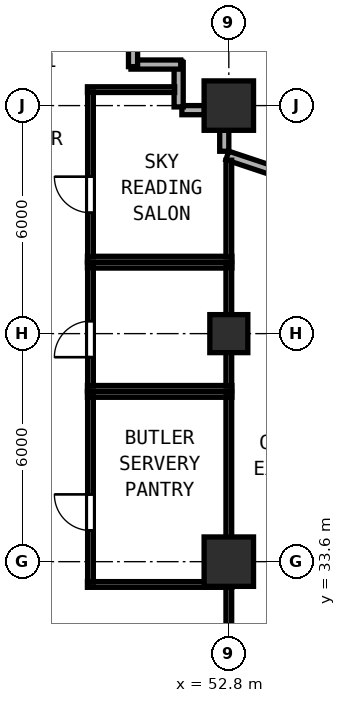
"""IFC4 building model, lengths in metres.
Left out: names, types, materials, properties, quantities, classifications, styles, units other than length and angle.
Written with IfcOpenShell. Run it as: python <this file> out.ifc"""

import sys

from ifc_helpers import new_model, si_unit, direction, frame, frame_2d, origin, origin_2d, place, context, subcontext, project, spatial, rectangle, hollow_rectangle, extrude, element, fill, save


model = new_model("IFC4")
c1 = context("Model", 3, precision=1e-05, world=origin(), true_north=direction((0.0, 1.0)))
c2 = subcontext(c1, "Body", "Model", "MODEL_VIEW")
j1 = project(units=[si_unit("LENGTHUNIT", "METRE"), si_unit("PLANEANGLEUNIT", "RADIAN")], contexts=[c1])
p1 = place(None, origin())
s1 = spatial("IfcSite", under=j1, at=p1, CompositionType="ELEMENT")
p2 = place(p1, origin())
s2 = spatial("IfcBuilding", under=s1, at=p2, CompositionType="ELEMENT")
p3 = place(p2, frame((0.0, 0.0, 39.2)))
s3 = spatial("IfcBuildingStorey", under=s2, at=p3, CompositionType="ELEMENT", Elevation=39.2)
for number, where, z_axis, x_axis in (
    (1, (52.8, 33.6, 0.0), (0.0, 0.0, 1.0), (1.0, 0.0, 0.0)),
    (2, (52.8, 45.6, 0.0), (0.0, 0.0, 1.0), (1.0, 0.0, 0.0)),
):
    element("IfcColumn", number, at=place(p3, frame(where, z_axis=z_axis, x_axis=x_axis)), inside=s3, PredefinedType="COLUMN", context=c2, shape_type="SweptSolid", body=[
        extrude(hollow_rectangle(XDim=1.3, YDim=1.3, WallThickness=0.048, at=origin_2d()), origin(), (0.0, 0.0, 1.0), 3.8),
    ])
p4 = place(p3, frame((52.8, 39.6, 0.0), z_axis=(0.0, 0.0, 1.0), x_axis=(1.0, 0.0, 0.0)))
e3 = element("IfcColumn", 3, at=p4, inside=s3, PredefinedType="COLUMN", context=c2, shape_type="SweptSolid", body=[
    extrude(hollow_rectangle(XDim=1.0, YDim=1.0, WallThickness=0.038, at=origin_2d()), origin(), (0.0, 0.0, 1.0), 3.8),
])
p5 = place(p3, frame((58.145, 42.492, 0.0), z_axis=(0.0, 0.0, 1.0), x_axis=(-0.948683298051, 0.316227766017, 0.0)))
e4 = element("IfcWall", 4, at=p5, inside=s3, PredefinedType="SOLIDWALL", context=c2, shape_type="SweptSolid", body=[
    extrude(rectangle(XDim=5.675, YDim=0.24, at=frame_2d((2.838, 0.0))), origin(), (0.0, 0.0, 1.0), 3.037),
])
p6 = place(p5, frame((1.6, 0.0, 0.85)))
e5 = element("IfcOpeningElement", 5, at=p6, cuts=e4, PredefinedType="OPENING", context=c2, shape_type="SweptSolid", body=[
    extrude(rectangle(XDim=1.2, YDim=1.85, at=frame_2d((0.6, 0.925))), frame((0.0, 0.13, 0.0), z_axis=(0.0, -1.0, 0.0), x_axis=(1.0, 0.0, 0.0)), (0.0, 0.0, 1.0), 0.26),
])
p7 = place(p3, frame((52.68, 44.398, 0.0), z_axis=(0.0, 0.0, 1.0), x_axis=(0.0, 1.0, 0.0)))
e6 = element("IfcWall", 6, at=p7, inside=s3, PredefinedType="SOLIDWALL", context=c2, shape_type="SweptSolid", body=[
    extrude(rectangle(XDim=0.56, YDim=0.24, at=frame_2d((0.28, 0.0))), origin(), (0.0, 0.0, 1.0), 3.037),
])
p8 = place(p3, frame((52.158, 45.48, 0.0), z_axis=(0.0, 0.0, 1.0), x_axis=(-1.0, 0.0, 0.0)))
e7 = element("IfcWall", 7, at=p8, inside=s3, PredefinedType="SOLIDWALL", context=c2, shape_type="SweptSolid", body=[
    extrude(rectangle(XDim=0.593, YDim=0.24, at=frame_2d((0.296, 0.0))), origin(), (0.0, 0.0, 1.0), 3.54),
])
p9 = place(p3, frame((51.48, 45.565, 0.0), z_axis=(0.0, 0.0, 1.0), x_axis=(0.0, 1.0, 0.0)))
e8 = element("IfcWall", 8, at=p9, inside=s3, PredefinedType="SOLIDWALL", context=c2, shape_type="SweptSolid", body=[
    extrude(rectangle(XDim=1.17, YDim=0.24, at=frame_2d((0.585, 0.0))), origin(), (0.0, 0.0, 1.0), 3.54),
])
p10 = place(p3, frame((51.535, 46.68, 0.0), z_axis=(0.0, 0.0, 1.0), x_axis=(-1.0, 0.0, 0.0)))
e9 = element("IfcWall", 9, at=p10, inside=s3, PredefinedType="SOLIDWALL", context=c2, shape_type="SweptSolid", body=[
    extrude(rectangle(XDim=1.31, YDim=0.24, at=frame_2d((0.655, 0.0))), origin(), (0.0, 0.0, 1.0), 3.54),
])
p11 = place(p3, frame((50.28, 46.625, 0.0), z_axis=(0.0, 0.0, 1.0), x_axis=(0.0, 1.0, 0.0)))
e10 = element("IfcWall", 10, at=p11, inside=s3, PredefinedType="SOLIDWALL", context=c2, shape_type="SweptSolid", body=[
    extrude(rectangle(XDim=1.37, YDim=0.24, at=frame_2d((0.685, 0.0))), origin(), (0.0, 0.0, 1.0), 3.54),
])
for number, where, z_axis, x_axis in (
    (11, (49.08, 38.0, 0.0), (0.0, 0.0, 1.0), (1.0, 0.0, 0.0)),
    (12, (49.08, 33.0, 0.0), (0.0, 0.0, 1.0), (1.0, 0.0, 0.0)),
):
    element("IfcWall", number, at=place(p3, frame(where, z_axis=z_axis, x_axis=x_axis)), inside=s3, PredefinedType="PARTITIONING", context=c2, shape_type="SweptSolid", body=[
        extrude(rectangle(XDim=3.8, YDim=0.15, at=frame_2d((1.9, 0.0))), origin(), (0.0, 0.0, 1.0), 3.54),
    ])
p12 = place(p3, frame((49.16, 33.06, 0.0), z_axis=(0.0, 0.0, 1.0), x_axis=(0.0, 1.0, 0.0)))
e13 = element("IfcWall", 13, at=p12, inside=s3, PredefinedType="PARTITIONING", context=c2, shape_type="SweptSolid", body=[
    extrude(rectangle(XDim=4.88, YDim=0.15, at=frame_2d((2.44, 0.0))), origin(), (0.0, 0.0, 1.0), 3.54),
])
p13 = place(p12, frame((1.36, 0.0, 0.0)))
e14 = element("IfcOpeningElement", 14, at=p13, cuts=e13, PredefinedType="OPENING", context=c2, shape_type="SweptSolid", body=[
    extrude(rectangle(XDim=0.95, YDim=2.12, at=frame_2d((0.475, 1.06))), frame((0.0, 0.085, 0.0), z_axis=(0.0, -1.0, 0.0), x_axis=(1.0, 0.0, 0.0)), (0.0, 0.0, 1.0), 0.17),
])
p14 = place(p3, frame((52.8, 33.06, 0.0), z_axis=(0.0, 0.0, 1.0), x_axis=(0.0, 1.0, 0.0)))
e15 = element("IfcWall", 15, at=p14, inside=s3, PredefinedType="PARTITIONING", context=c2, shape_type="SweptSolid", body=[
    extrude(rectangle(XDim=4.88, YDim=0.15, at=frame_2d((2.44, 0.0))), origin(), (0.0, 0.0, 1.0), 3.037),
])
for number, where, z_axis, x_axis in (
    (16, (49.08, 41.4, 0.0), (0.0, 0.0, 1.0), (1.0, 0.0, 0.0)),
    (17, (49.08, 38.16, 0.0), (0.0, 0.0, 1.0), (1.0, 0.0, 0.0)),
):
    element("IfcWall", number, at=place(p3, frame(where, z_axis=z_axis, x_axis=x_axis)), inside=s3, PredefinedType="PARTITIONING", context=c2, shape_type="SweptSolid", body=[
        extrude(rectangle(XDim=3.8, YDim=0.15, at=frame_2d((1.9, 0.0))), origin(), (0.0, 0.0, 1.0), 3.54),
    ])
p15 = place(p3, frame((49.16, 38.22, 0.0), z_axis=(0.0, 0.0, 1.0), x_axis=(0.0, 1.0, 0.0)))
e18 = element("IfcWall", 18, at=p15, inside=s3, PredefinedType="PARTITIONING", context=c2, shape_type="SweptSolid", body=[
    extrude(rectangle(XDim=3.12, YDim=0.15, at=frame_2d((1.56, 0.0))), origin(), (0.0, 0.0, 1.0), 3.54),
])
p16 = place(p15, frame((0.76, 0.0, 0.0)))
e19 = element("IfcOpeningElement", 19, at=p16, cuts=e18, PredefinedType="OPENING", context=c2, shape_type="SweptSolid", body=[
    extrude(rectangle(XDim=0.95, YDim=2.12, at=frame_2d((0.475, 1.06))), frame((0.0, 0.085, 0.0), z_axis=(0.0, -1.0, 0.0), x_axis=(1.0, 0.0, 0.0)), (0.0, 0.0, 1.0), 0.17),
])
p17 = place(p3, frame((52.8, 38.22, 0.0), z_axis=(0.0, 0.0, 1.0), x_axis=(0.0, 1.0, 0.0)))
e20 = element("IfcWall", 20, at=p17, inside=s3, PredefinedType="PARTITIONING", context=c2, shape_type="SweptSolid", body=[
    extrude(rectangle(XDim=3.12, YDim=0.15, at=frame_2d((1.56, 0.0))), origin(), (0.0, 0.0, 1.0), 3.037),
])
p18 = place(p3, frame((49.08, 46.02, 0.0), z_axis=(0.0, 0.0, 1.0), x_axis=(1.0, 0.0, 0.0)))
e21 = element("IfcWall", 21, at=p18, inside=s3, PredefinedType="PARTITIONING", context=c2, shape_type="SweptSolid", body=[
    extrude(rectangle(XDim=2.295, YDim=0.15, at=frame_2d((1.147, 0.0))), origin(), (0.0, 0.0, 1.0), 3.54),
])
p19 = place(p3, frame((49.08, 41.56, 0.0), z_axis=(0.0, 0.0, 1.0), x_axis=(1.0, 0.0, 0.0)))
e22 = element("IfcWall", 22, at=p19, inside=s3, PredefinedType="PARTITIONING", context=c2, shape_type="SweptSolid", body=[
    extrude(rectangle(XDim=3.8, YDim=0.15, at=frame_2d((1.9, 0.0))), origin(), (0.0, 0.0, 1.0), 3.54),
])
p20 = place(p3, frame((49.16, 41.62, 0.0), z_axis=(0.0, 0.0, 1.0), x_axis=(0.0, 1.0, 0.0)))
e23 = element("IfcWall", 23, at=p20, inside=s3, PredefinedType="PARTITIONING", context=c2, shape_type="SweptSolid", body=[
    extrude(rectangle(XDim=4.34, YDim=0.15, at=frame_2d((2.17, 0.0))), origin(), (0.0, 0.0, 1.0), 3.54),
])
p21 = place(p20, frame((1.16, 0.0, 0.0)))
e24 = element("IfcOpeningElement", 24, at=p21, cuts=e23, PredefinedType="OPENING", context=c2, shape_type="SweptSolid", body=[
    extrude(rectangle(XDim=0.95, YDim=2.12, at=frame_2d((0.475, 1.06))), frame((0.0, 0.085, 0.0), z_axis=(0.0, -1.0, 0.0), x_axis=(1.0, 0.0, 0.0)), (0.0, 0.0, 1.0), 0.17),
])
p22 = place(p3, frame((52.8, 41.62, 0.0), z_axis=(0.0, 0.0, 1.0), x_axis=(0.0, 1.0, 0.0)))
e25 = element("IfcWall", 25, at=p22, inside=s3, PredefinedType="PARTITIONING", context=c2, shape_type="SweptSolid", body=[
    extrude(rectangle(XDim=2.543, YDim=0.15, at=frame_2d((1.271, 0.0))), origin(), (0.0, 0.0, 1.0), 3.037),
])
p23 = place(p3, frame((52.8, 26.34, 0.0), z_axis=(0.0, 0.0, 1.0), x_axis=(0.0, 1.0, 0.0)))
e26 = element("IfcWall", 26, at=p23, inside=s3, PredefinedType="PARTITIONING", context=c2, shape_type="SweptSolid", body=[
    extrude(rectangle(XDim=6.6, YDim=0.15, at=frame_2d((3.3, 0.0))), origin(), (0.0, 0.0, 1.0), 3.037),
])
p24 = place(p13, origin())
e27 = element("IfcDoor", 27, at=p24, inside=s3, OperationType="SINGLE_SWING_RIGHT", PredefinedType="DOOR", context=c2, shape_type="SweptSolid", body=[
    extrude(rectangle(XDim=0.95, YDim=2.12, at=frame_2d((0.475, 1.06))), frame((0.0, 0.025, 0.0), z_axis=(0.0, -1.0, 0.0), x_axis=(1.0, 0.0, 0.0)), (0.0, 0.0, 1.0), 0.05),
])
fill(e14, e27)
p25 = place(p16, origin())
e28 = element("IfcDoor", 28, at=p25, inside=s3, OperationType="SINGLE_SWING_LEFT", PredefinedType="DOOR", context=c2, shape_type="SweptSolid", body=[
    extrude(rectangle(XDim=0.95, YDim=2.12, at=frame_2d((0.475, 1.06))), frame((0.0, 0.025, 0.0), z_axis=(0.0, -1.0, 0.0), x_axis=(1.0, 0.0, 0.0)), (0.0, 0.0, 1.0), 0.05),
])
fill(e19, e28)
p26 = place(p21, origin())
e29 = element("IfcDoor", 29, at=p26, inside=s3, OperationType="SINGLE_SWING_RIGHT", PredefinedType="DOOR", context=c2, shape_type="SweptSolid", body=[
    extrude(rectangle(XDim=0.95, YDim=2.12, at=frame_2d((0.475, 1.06))), frame((0.0, 0.025, 0.0), z_axis=(0.0, -1.0, 0.0), x_axis=(1.0, 0.0, 0.0)), (0.0, 0.0, 1.0), 0.05),
])
fill(e24, e29)
save(model, sys.argv[1])
